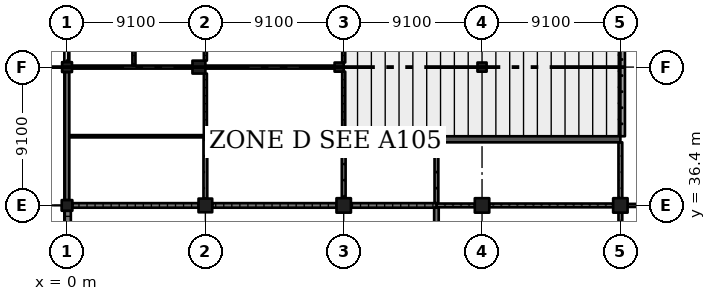
"""IFC4 building model, lengths in metres.
Left out: names, types, materials, properties, quantities, classifications, styles, units other than length and angle.
Written with IfcOpenShell. Run it as: python <this file> out.ifc"""

import sys

from ifc_helpers import new_model, si_unit, direction, frame, frame_2d, origin, origin_2d, place, context, subcontext, project, spatial, rectangle, extrude, element, fill, save


model = new_model("IFC4")
c1 = context("Model", 3, precision=1e-05, world=origin(), true_north=direction((0.0, 1.0)))
c2 = subcontext(c1, "Body", "Model", "MODEL_VIEW")
j1 = project(units=[si_unit("LENGTHUNIT", "METRE"), si_unit("PLANEANGLEUNIT", "RADIAN")], contexts=[c1])
p1 = place(None, origin())
s1 = spatial("IfcSite", under=j1, at=p1, CompositionType="ELEMENT")
p2 = place(p1, origin())
s2 = spatial("IfcBuilding", under=s1, at=p2, CompositionType="ELEMENT")
p3 = place(p2, origin())
s3 = spatial("IfcBuildingStorey", under=s2, at=p3, CompositionType="ELEMENT", Elevation=0.0)
p4 = place(p3, frame((0.0, 36.4, -0.4), z_axis=(0.0, 0.0, 1.0), x_axis=(1.0, 0.0, 0.0)))
e1 = element("IfcColumn", 1, at=p4, inside=s3, PredefinedType="COLUMN", context=c2, shape_type="SweptSolid", body=[
    extrude(rectangle(XDim=0.7, YDim=0.7, at=origin_2d()), origin(), (0.0, 0.0, 1.0), 6.77),
])
p5 = place(p3, frame((0.0, 45.5, -0.4), z_axis=(0.0, 0.0, 1.0), x_axis=(1.0, 0.0, 0.0)))
e2 = element("IfcColumn", 2, at=p5, inside=s3, PredefinedType="COLUMN", context=c2, shape_type="SweptSolid", body=[
    extrude(rectangle(XDim=0.65, YDim=0.65, at=origin_2d()), origin(), (0.0, 0.0, 1.0), 6.77),
])
p6 = place(p3, frame((9.1, 36.4, -0.4), z_axis=(0.0, 0.0, 1.0), x_axis=(1.0, 0.0, 0.0)))
e3 = element("IfcColumn", 3, at=p6, inside=s3, PredefinedType="COLUMN", context=c2, shape_type="SweptSolid", body=[
    extrude(rectangle(XDim=0.9, YDim=0.9, at=origin_2d()), origin(), (0.0, 0.0, 1.0), 6.77),
])
p7 = place(p3, frame((8.675, 45.5, -0.4), z_axis=(0.0, 0.0, 1.0), x_axis=(1.0, 0.0, 0.0)))
e4 = element("IfcColumn", 4, at=p7, inside=s3, PredefinedType="COLUMN", context=c2, shape_type="SweptSolid", body=[
    extrude(rectangle(XDim=0.85, YDim=0.85, at=origin_2d()), origin(), (0.0, 0.0, 1.0), 6.77),
])
p8 = place(p3, frame((18.2, 36.4, -0.4), z_axis=(0.0, 0.0, 1.0), x_axis=(1.0, 0.0, 0.0)))
e5 = element("IfcColumn", 5, at=p8, inside=s3, PredefinedType="COLUMN", context=c2, shape_type="SweptSolid", body=[
    extrude(rectangle(XDim=0.95, YDim=0.95, at=origin_2d()), origin(), (0.0, 0.0, 1.0), 6.77),
])
p9 = place(p3, frame((17.9, 45.5, -0.4), z_axis=(0.0, 0.0, 1.0), x_axis=(1.0, 0.0, 0.0)))
e6 = element("IfcColumn", 6, at=p9, inside=s3, PredefinedType="COLUMN", context=c2, shape_type="SweptSolid", body=[
    extrude(rectangle(XDim=0.6, YDim=0.6, at=origin_2d()), origin(), (0.0, 0.0, 1.0), 6.77),
])
p10 = place(p3, frame((27.3, 36.4, -0.4), z_axis=(0.0, 0.0, 1.0), x_axis=(1.0, 0.0, 0.0)))
e7 = element("IfcColumn", 7, at=p10, inside=s3, PredefinedType="COLUMN", context=c2, shape_type="SweptSolid", body=[
    extrude(rectangle(XDim=0.95, YDim=0.95, at=origin_2d()), origin(), (0.0, 0.0, 1.0), 6.77),
])
p11 = place(p3, frame((27.3, 45.5, -0.4), z_axis=(0.0, 0.0, 1.0), x_axis=(1.0, 0.0, 0.0)))
e8 = element("IfcColumn", 8, at=p11, inside=s3, PredefinedType="COLUMN", context=c2, shape_type="SweptSolid", body=[
    extrude(rectangle(XDim=0.6, YDim=0.6, at=origin_2d()), origin(), (0.0, 0.0, 1.0), 2.133),
])
p12 = place(p3, frame((36.4, 36.4, -0.4), z_axis=(0.0, 0.0, 1.0), x_axis=(1.0, 0.0, 0.0)))
e9 = element("IfcColumn", 9, at=p12, inside=s3, PredefinedType="COLUMN", context=c2, shape_type="SweptSolid", body=[
    extrude(rectangle(XDim=0.95, YDim=0.95, at=origin_2d()), origin(), (0.0, 0.0, 1.0), 6.77),
])
p13 = place(p3, frame((36.55, 40.95, -0.4), z_axis=(0.0, 0.0, 1.0), x_axis=(0.0, 1.0, 0.0)))
e10 = element("IfcWall", 10, at=p13, inside=s3, PredefinedType="SOLIDWALL", context=c2, shape_type="SweptSolid", body=[
    extrude(rectangle(XDim=27.3, YDim=0.3, at=frame_2d((13.65, 0.0))), origin(), (0.0, 0.0, 1.0), 1.45),
])
p14 = place(p3, frame((36.4, 40.75, -0.4), z_axis=(0.0, 0.0, 1.0), x_axis=(-1.0, 0.0, 0.0)))
e11 = element("IfcWall", 11, at=p14, inside=s3, PredefinedType="SHEAR", context=c2, shape_type="SweptSolid", body=[
    extrude(rectangle(XDim=18.2, YDim=0.4, at=frame_2d((9.1, 0.0))), origin(), (0.0, 0.0, 1.0), 6.77),
])
p15 = place(p3, frame((0.0, 54.275, 0.0), z_axis=(0.0, 0.0, 1.0), x_axis=(0.0, -1.0, 0.0)))
e12 = element("IfcWall", 12, at=p15, inside=s3, PredefinedType="SOLIDWALL", context=c2, shape_type="SweptSolid", body=[
    extrude(rectangle(XDim=8.45, YDim=0.3, at=frame_2d((4.225, 0.0))), origin(), (0.0, 0.0, 1.0), 3.75),
])
p16 = place(p15, frame((4.44, 0.0, 0.0)))
e13 = element("IfcOpeningElement", 13, at=p16, cuts=e12, PredefinedType="OPENING", context=c2, shape_type="SweptSolid", body=[
    extrude(rectangle(XDim=3.6, YDim=2.7, at=frame_2d((1.8, 1.35))), frame((0.0, 0.16, 0.0), z_axis=(0.0, -1.0, 0.0), x_axis=(1.0, 0.0, 0.0)), (0.0, 0.0, 1.0), 0.32),
])
p17 = place(p15, frame((0.41, 0.0, 0.0)))
e14 = element("IfcOpeningElement", 14, at=p17, cuts=e12, PredefinedType="OPENING", context=c2, shape_type="SweptSolid", body=[
    extrude(rectangle(XDim=3.6, YDim=2.7, at=frame_2d((1.8, 1.35))), frame((0.0, 0.16, 0.0), z_axis=(0.0, -1.0, 0.0), x_axis=(1.0, 0.0, 0.0)), (0.0, 0.0, 1.0), 0.32),
])
p18 = place(p3, frame((0.0, 45.175, 0.0), z_axis=(0.0, 0.0, 1.0), x_axis=(0.0, -1.0, 0.0)))
e15 = element("IfcWall", 15, at=p18, inside=s3, PredefinedType="SOLIDWALL", context=c2, shape_type="SweptSolid", body=[
    extrude(rectangle(XDim=8.425, YDim=0.3, at=frame_2d((4.212, 0.0))), origin(), (0.0, 0.0, 1.0), 5.27),
])
p19 = place(p3, frame((0.05, 36.05, 0.0), z_axis=(0.0, 0.0, 1.0), x_axis=(0.0, -1.0, 0.0)))
e16 = element("IfcWall", 16, at=p19, inside=s3, PredefinedType="SOLIDWALL", context=c2, shape_type="SweptSolid", body=[
    extrude(rectangle(XDim=8.375, YDim=0.4, at=frame_2d((4.188, 0.0))), origin(), (0.0, 0.0, 1.0), 5.32),
])
p20 = place(p19, frame((1.95, 0.0, 0.0)))
e17 = element("IfcOpeningElement", 17, at=p20, cuts=e16, PredefinedType="OPENING", context=c2, shape_type="SweptSolid", body=[
    extrude(rectangle(XDim=4.5, YDim=4.8, at=frame_2d((2.25, 2.4))), frame((0.0, 0.21, 0.0), z_axis=(0.0, -1.0, 0.0), x_axis=(1.0, 0.0, 0.0)), (0.0, 0.0, 1.0), 0.42),
])
p21 = place(p19, frame((0.475, 0.0, 0.0)))
e18 = element("IfcOpeningElement", 18, at=p21, cuts=e16, PredefinedType="OPENING", context=c2, shape_type="SweptSolid", body=[
    extrude(rectangle(XDim=1.0, YDim=2.1, at=frame_2d((0.5, 1.05))), frame((0.0, 0.21, 0.0), z_axis=(0.0, -1.0, 0.0), x_axis=(1.0, 0.0, 0.0)), (0.0, 0.0, 1.0), 0.42),
])
p22 = place(p3, frame((0.15, 40.95, 0.0), z_axis=(0.0, 0.0, 1.0), x_axis=(1.0, 0.0, 0.0)))
e19 = element("IfcWall", 19, at=p22, inside=s3, PredefinedType="PARTITIONING", context=c2, shape_type="SweptSolid", body=[
    extrude(rectangle(XDim=8.95, YDim=0.15, at=frame_2d((4.475, 0.0))), origin(), (0.0, 0.0, 1.0), 6.02),
])
p23 = place(p3, frame((0.35, 36.4, 0.0), z_axis=(0.0, 0.0, 1.0), x_axis=(1.0, 0.0, 0.0)))
e20 = element("IfcWall", 20, at=p23, inside=s3, PredefinedType="SOLIDWALL", context=c2, shape_type="SweptSolid", body=[
    extrude(rectangle(XDim=8.3, YDim=0.3, at=frame_2d((4.15, 0.0))), origin(), (0.0, 0.0, 1.0), 5.32),
])
p24 = place(p23, frame((3.65, 0.0, 0.0)))
e21 = element("IfcOpeningElement", 21, at=p24, cuts=e20, PredefinedType="OPENING", context=c2, shape_type="SweptSolid", body=[
    extrude(rectangle(XDim=1.0, YDim=2.1, at=frame_2d((0.5, 1.05))), frame((0.0, 0.16, 0.0), z_axis=(0.0, -1.0, 0.0), x_axis=(1.0, 0.0, 0.0)), (0.0, 0.0, 1.0), 0.32),
])
p25 = place(p3, frame((0.325, 45.5, 0.0), z_axis=(0.0, 0.0, 1.0), x_axis=(1.0, 0.0, 0.0)))
e22 = element("IfcWall", 22, at=p25, inside=s3, PredefinedType="PARTITIONING", context=c2, shape_type="SweptSolid", body=[
    extrude(rectangle(XDim=7.925, YDim=0.2, at=frame_2d((3.962, 0.0))), origin(), (0.0, 0.0, 1.0), 5.32),
])
p26 = place(p3, frame((4.4, 45.6, 0.0), z_axis=(0.0, 0.0, 1.0), x_axis=(0.0, 1.0, 0.0)))
e23 = element("IfcWall", 23, at=p26, inside=s3, PredefinedType="PARTITIONING", context=c2, shape_type="SweptSolid", body=[
    extrude(rectangle(XDim=18.0, YDim=0.2, at=frame_2d((9.0, 0.0))), origin(), (0.0, 0.0, 1.0), 6.02),
])
p27 = place(p26, frame((0.65, 0.0, 0.0)))
e24 = element("IfcOpeningElement", 24, at=p27, cuts=e23, PredefinedType="OPENING", context=c2, shape_type="SweptSolid", body=[
    extrude(rectangle(XDim=1.8, YDim=2.4, at=frame_2d((0.9, 1.2))), frame((0.0, 0.11, 0.0), z_axis=(0.0, -1.0, 0.0), x_axis=(1.0, 0.0, 0.0)), (0.0, 0.0, 1.0), 0.22),
])
p28 = place(p26, frame((3.55, 0.0, 0.0)))
e25 = element("IfcOpeningElement", 25, at=p28, cuts=e23, PredefinedType="OPENING", context=c2, shape_type="SweptSolid", body=[
    extrude(rectangle(XDim=1.8, YDim=2.4, at=frame_2d((0.9, 1.2))), frame((0.0, 0.11, 0.0), z_axis=(0.0, -1.0, 0.0), x_axis=(1.0, 0.0, 0.0)), (0.0, 0.0, 1.0), 0.22),
])
p29 = place(p26, frame((6.65, 0.0, 0.0)))
e26 = element("IfcOpeningElement", 26, at=p29, cuts=e23, PredefinedType="OPENING", context=c2, shape_type="SweptSolid", body=[
    extrude(rectangle(XDim=1.8, YDim=2.4, at=frame_2d((0.9, 1.2))), frame((0.0, 0.11, 0.0), z_axis=(0.0, -1.0, 0.0), x_axis=(1.0, 0.0, 0.0)), (0.0, 0.0, 1.0), 0.22),
])
p30 = place(p26, frame((9.65, 0.0, 0.0)))
e27 = element("IfcOpeningElement", 27, at=p30, cuts=e23, PredefinedType="OPENING", context=c2, shape_type="SweptSolid", body=[
    extrude(rectangle(XDim=1.8, YDim=2.4, at=frame_2d((0.9, 1.2))), frame((0.0, 0.11, 0.0), z_axis=(0.0, -1.0, 0.0), x_axis=(1.0, 0.0, 0.0)), (0.0, 0.0, 1.0), 0.22),
])
p31 = place(p26, frame((12.65, 0.0, 0.0)))
e28 = element("IfcOpeningElement", 28, at=p31, cuts=e23, PredefinedType="OPENING", context=c2, shape_type="SweptSolid", body=[
    extrude(rectangle(XDim=1.8, YDim=2.4, at=frame_2d((0.9, 1.2))), frame((0.0, 0.11, 0.0), z_axis=(0.0, -1.0, 0.0), x_axis=(1.0, 0.0, 0.0)), (0.0, 0.0, 1.0), 0.22),
])
p32 = place(p26, frame((15.65, 0.0, 0.0)))
e29 = element("IfcOpeningElement", 29, at=p32, cuts=e23, PredefinedType="OPENING", context=c2, shape_type="SweptSolid", body=[
    extrude(rectangle(XDim=1.8, YDim=2.4, at=frame_2d((0.9, 1.2))), frame((0.0, 0.11, 0.0), z_axis=(0.0, -1.0, 0.0), x_axis=(1.0, 0.0, 0.0)), (0.0, 0.0, 1.0), 0.22),
])
p33 = place(p3, frame((9.1, 40.825, 0.0), z_axis=(0.0, 0.0, 1.0), x_axis=(0.0, -1.0, 0.0)))
e30 = element("IfcWall", 30, at=p33, inside=s3, PredefinedType="SOLIDWALL", context=c2, shape_type="SweptSolid", body=[
    extrude(rectangle(XDim=3.975, YDim=0.25, at=frame_2d((1.987, 0.0))), origin(), (0.0, 0.0, 1.0), 5.32),
])
p34 = place(p3, frame((9.1, 40.95, 0.0), z_axis=(0.0, 0.0, 1.0), x_axis=(1.0, 0.0, 0.0)))
e31 = element("IfcWall", 31, at=p34, inside=s3, PredefinedType="SOLIDWALL", context=c2, shape_type="SweptSolid", body=[
    extrude(rectangle(XDim=9.2, YDim=0.25, at=frame_2d((4.6, 0.0))), origin(), (0.0, 0.0, 1.0), 6.02),
])
p35 = place(p3, frame((9.1, 41.075, 0.0), z_axis=(0.0, 0.0, 1.0), x_axis=(0.0, 1.0, 0.0)))
e32 = element("IfcWall", 32, at=p35, inside=s3, PredefinedType="PARTITIONING", context=c2, shape_type="SweptSolid", body=[
    extrude(rectangle(XDim=4.0, YDim=0.2, at=frame_2d((2.0, 0.0))), origin(), (0.0, 0.0, 1.0), 5.32),
])
p36 = place(p35, frame((1.45, 0.0, 0.0)))
e33 = element("IfcOpeningElement", 33, at=p36, cuts=e32, PredefinedType="OPENING", context=c2, shape_type="SweptSolid", body=[
    extrude(rectangle(XDim=1.0, YDim=2.1, at=frame_2d((0.5, 1.05))), frame((0.0, 0.11, 0.0), z_axis=(0.0, -1.0, 0.0), x_axis=(1.0, 0.0, 0.0)), (0.0, 0.0, 1.0), 0.22),
])
p37 = place(p3, frame((9.1, 45.925, 0.0), z_axis=(0.0, 0.0, 1.0), x_axis=(0.0, 1.0, 0.0)))
e34 = element("IfcWall", 34, at=p37, inside=s3, PredefinedType="PARTITIONING", context=c2, shape_type="SweptSolid", body=[
    extrude(rectangle(XDim=8.25, YDim=0.2, at=frame_2d((4.125, 0.0))), origin(), (0.0, 0.0, 1.0), 5.32),
])
p38 = place(p37, frame((1.15, 0.0, 0.0)))
e35 = element("IfcOpeningElement", 35, at=p38, cuts=e34, PredefinedType="OPENING", context=c2, shape_type="SweptSolid", body=[
    extrude(rectangle(XDim=1.8, YDim=2.4, at=frame_2d((0.9, 1.2))), frame((0.0, 0.11, 0.0), z_axis=(0.0, -1.0, 0.0), x_axis=(1.0, 0.0, 0.0)), (0.0, 0.0, 1.0), 0.22),
])
p39 = place(p37, frame((5.25, 0.0, 0.0)))
e36 = element("IfcOpeningElement", 36, at=p39, cuts=e34, PredefinedType="OPENING", context=c2, shape_type="SweptSolid", body=[
    extrude(rectangle(XDim=1.8, YDim=2.4, at=frame_2d((0.9, 1.2))), frame((0.0, 0.11, 0.0), z_axis=(0.0, -1.0, 0.0), x_axis=(1.0, 0.0, 0.0)), (0.0, 0.0, 1.0), 0.22),
])
p40 = place(p37, frame((3.45, 0.0, 0.0)))
e37 = element("IfcOpeningElement", 37, at=p40, cuts=e34, PredefinedType="OPENING", context=c2, shape_type="SweptSolid", body=[
    extrude(rectangle(XDim=1.8, YDim=2.4, at=frame_2d((0.9, 1.2))), frame((0.0, 0.11, 0.0), z_axis=(0.0, -1.0, 0.0), x_axis=(1.0, 0.0, 0.0)), (0.0, 0.0, 1.0), 0.22),
])
p41 = place(p3, frame((9.55, 36.4, 0.0), z_axis=(0.0, 0.0, 1.0), x_axis=(1.0, 0.0, 0.0)))
e38 = element("IfcWall", 38, at=p41, inside=s3, PredefinedType="SOLIDWALL", context=c2, shape_type="SweptSolid", body=[
    extrude(rectangle(XDim=8.175, YDim=0.3, at=frame_2d((4.087, 0.0))), origin(), (0.0, 0.0, 1.0), 5.32),
])
p42 = place(p41, frame((3.55, 0.0, 0.0)))
e39 = element("IfcOpeningElement", 39, at=p42, cuts=e38, PredefinedType="OPENING", context=c2, shape_type="SweptSolid", body=[
    extrude(rectangle(XDim=1.0, YDim=2.1, at=frame_2d((0.5, 1.05))), frame((0.0, 0.16, 0.0), z_axis=(0.0, -1.0, 0.0), x_axis=(1.0, 0.0, 0.0)), (0.0, 0.0, 1.0), 0.32),
])
p43 = place(p3, frame((17.6, 45.5, 0.0), z_axis=(0.0, 0.0, 1.0), x_axis=(-1.0, 0.0, 0.0)))
e40 = element("IfcWall", 40, at=p43, inside=s3, PredefinedType="PARTITIONING", context=c2, shape_type="SweptSolid", body=[
    extrude(rectangle(XDim=8.5, YDim=0.2, at=frame_2d((4.25, 0.0))), origin(), (0.0, 0.0, 1.0), 5.27),
])
p44 = place(p43, frame((0.65, 0.0, 0.0)))
e41 = element("IfcOpeningElement", 41, at=p44, cuts=e40, PredefinedType="OPENING", context=c2, shape_type="SweptSolid", body=[
    extrude(rectangle(XDim=3.0, YDim=2.4, at=frame_2d((1.5, 1.2))), frame((0.0, 0.11, 0.0), z_axis=(0.0, -1.0, 0.0), x_axis=(1.0, 0.0, 0.0)), (0.0, 0.0, 1.0), 0.22),
])
p45 = place(p43, frame((4.85, 0.0, 0.0)))
e42 = element("IfcOpeningElement", 42, at=p45, cuts=e40, PredefinedType="OPENING", context=c2, shape_type="SweptSolid", body=[
    extrude(rectangle(XDim=3.0, YDim=2.4, at=frame_2d((1.5, 1.2))), frame((0.0, 0.11, 0.0), z_axis=(0.0, -1.0, 0.0), x_axis=(1.0, 0.0, 0.0)), (0.0, 0.0, 1.0), 0.22),
])
p46 = place(p3, frame((18.2, 40.55, 0.0), z_axis=(0.0, 0.0, 1.0), x_axis=(0.0, -1.0, 0.0)))
e43 = element("IfcWall", 43, at=p46, inside=s3, PredefinedType="SOLIDWALL", context=c2, shape_type="SweptSolid", body=[
    extrude(rectangle(XDim=3.675, YDim=0.25, at=frame_2d((1.837, 0.0))), origin(), (0.0, 0.0, 1.0), 5.02),
])
p47 = place(p3, frame((18.2, 45.2, 0.0), z_axis=(0.0, 0.0, 1.0), x_axis=(0.0, -1.0, 0.0)))
e44 = element("IfcWall", 44, at=p47, inside=s3, PredefinedType="PARTITIONING", context=c2, shape_type="SweptSolid", body=[
    extrude(rectangle(XDim=4.125, YDim=0.2, at=frame_2d((2.062, 0.0))), origin(), (0.0, 0.0, 1.0), 5.02),
])
p48 = place(p3, frame((18.2, 54.3, 0.0), z_axis=(0.0, 0.0, 1.0), x_axis=(0.0, -1.0, 0.0)))
e45 = element("IfcWall", 45, at=p48, inside=s3, PredefinedType="PARTITIONING", context=c2, shape_type="SweptSolid", body=[
    extrude(rectangle(XDim=8.5, YDim=0.2, at=frame_2d((4.25, 0.0))), origin(), (0.0, 0.0, 1.0), 5.02),
])
p49 = place(p3, frame((18.675, 36.4, 0.0), z_axis=(0.0, 0.0, 1.0), x_axis=(1.0, 0.0, 0.0)))
e46 = element("IfcWall", 46, at=p49, inside=s3, PredefinedType="SOLIDWALL", context=c2, shape_type="SweptSolid", body=[
    extrude(rectangle(XDim=5.625, YDim=0.3, at=frame_2d((2.812, 0.0))), origin(), (0.0, 0.0, 1.0), 5.32),
])
p50 = place(p49, frame((2.35, 0.0, 0.0)))
e47 = element("IfcOpeningElement", 47, at=p50, cuts=e46, PredefinedType="OPENING", context=c2, shape_type="SweptSolid", body=[
    extrude(rectangle(XDim=1.0, YDim=2.1, at=frame_2d((0.5, 1.05))), frame((0.0, 0.16, 0.0), z_axis=(0.0, -1.0, 0.0), x_axis=(1.0, 0.0, 0.0)), (0.0, 0.0, 1.0), 0.32),
])
p51 = place(p3, frame((24.3, 36.25, 0.0), z_axis=(0.0, 0.0, 1.0), x_axis=(0.0, -1.0, 0.0)))
e48 = element("IfcWall", 48, at=p51, inside=s3, PredefinedType="SOLIDWALL", context=c2, shape_type="SweptSolid", body=[
    extrude(rectangle(XDim=6.32, YDim=0.3, at=frame_2d((3.16, 0.0))), origin(), (0.0, 0.0, 1.0), 6.02),
])
p52 = place(p3, frame((24.3, 36.4, 0.0), z_axis=(0.0, 0.0, 1.0), x_axis=(1.0, 0.0, 0.0)))
e49 = element("IfcWall", 49, at=p52, inside=s3, PredefinedType="SOLIDWALL", context=c2, shape_type="SweptSolid", body=[
    extrude(rectangle(XDim=2.525, YDim=0.25, at=frame_2d((1.262, 0.0))), origin(), (0.0, 0.0, 1.0), 5.32),
])
p53 = place(p3, frame((24.3, 40.55, 0.0), z_axis=(0.0, 0.0, 1.0), x_axis=(0.0, -1.0, 0.0)))
e50 = element("IfcWall", 50, at=p53, inside=s3, PredefinedType="SOLIDWALL", context=c2, shape_type="SweptSolid", body=[
    extrude(rectangle(XDim=4.0, YDim=0.25, at=frame_2d((2.0, 0.0))), origin(), (0.0, 0.0, 1.0), 6.02),
])
p54 = place(p3, frame((27.775, 36.4, 0.0), z_axis=(0.0, 0.0, 1.0), x_axis=(1.0, 0.0, 0.0)))
e51 = element("IfcWall", 51, at=p54, inside=s3, PredefinedType="SOLIDWALL", context=c2, shape_type="SweptSolid", body=[
    extrude(rectangle(XDim=8.15, YDim=0.25, at=frame_2d((4.075, 0.0))), origin(), (0.0, 0.0, 1.0), 5.32),
])
p55 = place(p3, frame((36.4, 35.925, 0.0), z_axis=(0.0, 0.0, 1.0), x_axis=(0.0, -1.0, 0.0)))
e52 = element("IfcWall", 52, at=p55, inside=s3, PredefinedType="SOLIDWALL", context=c2, shape_type="SweptSolid", body=[
    extrude(rectangle(XDim=8.175, YDim=0.25, at=frame_2d((4.087, 0.0))), origin(), (0.0, 0.0, 1.0), 5.32),
])
p56 = place(p3, frame((36.4, 40.55, 0.0), z_axis=(0.0, 0.0, 1.0), x_axis=(0.0, -1.0, 0.0)))
e53 = element("IfcWall", 53, at=p56, inside=s3, PredefinedType="SOLIDWALL", context=c2, shape_type="SweptSolid", body=[
    extrude(rectangle(XDim=3.675, YDim=0.25, at=frame_2d((1.837, 0.0))), origin(), (0.0, 0.0, 1.0), 6.02),
])
p57 = place(p56, frame((1.35, 0.0, 0.0)))
e54 = element("IfcOpeningElement", 54, at=p57, cuts=e53, PredefinedType="OPENING", context=c2, shape_type="SweptSolid", body=[
    extrude(rectangle(XDim=1.0, YDim=2.1, at=frame_2d((0.5, 1.05))), frame((0.0, 0.135, 0.0), z_axis=(0.0, -1.0, 0.0), x_axis=(1.0, 0.0, 0.0)), (0.0, 0.0, 1.0), 0.27),
])
p58 = place(p3, frame((36.875, 36.4, 0.0), z_axis=(0.0, 0.0, 1.0), x_axis=(1.0, 0.0, 0.0)))
e55 = element("IfcWall", 55, at=p58, inside=s3, PredefinedType="PARTITIONING", context=c2, shape_type="SweptSolid", body=[
    extrude(rectangle(XDim=3.675, YDim=0.2, at=frame_2d((1.837, 0.0))), origin(), (0.0, 0.0, 1.0), 6.02),
])
p59 = place(p58, frame((0.65, 0.0, 0.0)))
e56 = element("IfcOpeningElement", 56, at=p59, cuts=e55, PredefinedType="OPENING", context=c2, shape_type="SweptSolid", body=[
    extrude(rectangle(XDim=2.4, YDim=2.4, at=frame_2d((1.2, 1.2))), frame((0.0, 0.11, 0.0), z_axis=(0.0, -1.0, 0.0), x_axis=(1.0, 0.0, 0.0)), (0.0, 0.0, 1.0), 0.22),
])
p60 = place(p16, frame((3.6, 0.0, 0.0), z_axis=(0.0, 0.0, 1.0), x_axis=(-1.0, 0.0, 0.0)))
e57 = element("IfcDoor", 57, at=p60, inside=s3, OperationType="DOUBLE_DOOR_SINGLE_SWING", PredefinedType="DOOR", context=c2, shape_type="SweptSolid", body=[
    extrude(rectangle(XDim=3.6, YDim=2.7, at=frame_2d((1.8, 1.35))), frame((0.0, 0.025, 0.0), z_axis=(0.0, -1.0, 0.0), x_axis=(1.0, 0.0, 0.0)), (0.0, 0.0, 1.0), 0.05),
])
fill(e13, e57)
p61 = place(p21, frame((1.0, 0.0, 0.0), z_axis=(0.0, 0.0, 1.0), x_axis=(-1.0, 0.0, 0.0)))
e58 = element("IfcDoor", 58, at=p61, inside=s3, OperationType="SINGLE_SWING_LEFT", PredefinedType="DOOR", context=c2, shape_type="SweptSolid", body=[
    extrude(rectangle(XDim=1.0, YDim=2.1, at=frame_2d((0.5, 1.05))), frame((0.0, 0.025, 0.0), z_axis=(0.0, -1.0, 0.0), x_axis=(1.0, 0.0, 0.0)), (0.0, 0.0, 1.0), 0.05),
])
fill(e18, e58)
p62 = place(p24, origin())
e59 = element("IfcDoor", 59, at=p62, inside=s3, OperationType="SINGLE_SWING_RIGHT", PredefinedType="DOOR", context=c2, shape_type="SweptSolid", body=[
    extrude(rectangle(XDim=1.0, YDim=2.1, at=frame_2d((0.5, 1.05))), frame((0.0, 0.025, 0.0), z_axis=(0.0, -1.0, 0.0), x_axis=(1.0, 0.0, 0.0)), (0.0, 0.0, 1.0), 0.05),
])
fill(e21, e59)
p63 = place(p50, origin())
e60 = element("IfcDoor", 60, at=p63, inside=s3, OperationType="SINGLE_SWING_LEFT", PredefinedType="DOOR", context=c2, shape_type="SweptSolid", body=[
    extrude(rectangle(XDim=1.0, YDim=2.1, at=frame_2d((0.5, 1.05))), frame((0.0, 0.025, 0.0), z_axis=(0.0, -1.0, 0.0), x_axis=(1.0, 0.0, 0.0)), (0.0, 0.0, 1.0), 0.05),
])
fill(e47, e60)
p64 = place(p57, origin())
e61 = element("IfcDoor", 61, at=p64, inside=s3, OperationType="SINGLE_SWING_RIGHT", PredefinedType="DOOR", context=c2, shape_type="SweptSolid", body=[
    extrude(rectangle(XDim=1.0, YDim=2.1, at=frame_2d((0.5, 1.05))), frame((0.0, 0.025, 0.0), z_axis=(0.0, -1.0, 0.0), x_axis=(1.0, 0.0, 0.0)), (0.0, 0.0, 1.0), 0.05),
])
fill(e54, e61)
p65 = place(p42, origin())
e62 = element("IfcDoor", 62, at=p65, inside=s3, OperationType="SINGLE_SWING_RIGHT", PredefinedType="DOOR", context=c2, shape_type="SweptSolid", body=[
    extrude(rectangle(XDim=1.0, YDim=2.1, at=frame_2d((0.5, 1.05))), frame((0.0, 0.025, 0.0), z_axis=(0.0, -1.0, 0.0), x_axis=(1.0, 0.0, 0.0)), (0.0, 0.0, 1.0), 0.05),
])
fill(e39, e62)
p66 = place(p36, origin())
e63 = element("IfcDoor", 63, at=p66, inside=s3, OperationType="SINGLE_SWING_RIGHT", PredefinedType="DOOR", context=c2, shape_type="SweptSolid", body=[
    extrude(rectangle(XDim=1.0, YDim=2.1, at=frame_2d((0.5, 1.05))), frame((0.0, 0.025, 0.0), z_axis=(0.0, -1.0, 0.0), x_axis=(1.0, 0.0, 0.0)), (0.0, 0.0, 1.0), 0.05),
])
fill(e33, e63)
p67 = place(p44, origin())
e64 = element("IfcDoor", 64, at=p67, inside=s3, OperationType="DOUBLE_DOOR_SINGLE_SWING", PredefinedType="DOOR", context=c2, shape_type="SweptSolid", body=[
    extrude(rectangle(XDim=3.0, YDim=2.4, at=frame_2d((1.5, 1.2))), frame((0.0, 0.025, 0.0), z_axis=(0.0, -1.0, 0.0), x_axis=(1.0, 0.0, 0.0)), (0.0, 0.0, 1.0), 0.05),
])
fill(e41, e64)
p68 = place(p45, origin())
e65 = element("IfcDoor", 65, at=p68, inside=s3, OperationType="DOUBLE_DOOR_SINGLE_SWING", PredefinedType="DOOR", context=c2, shape_type="SweptSolid", body=[
    extrude(rectangle(XDim=3.0, YDim=2.4, at=frame_2d((1.5, 1.2))), frame((0.0, 0.025, 0.0), z_axis=(0.0, -1.0, 0.0), x_axis=(1.0, 0.0, 0.0)), (0.0, 0.0, 1.0), 0.05),
])
fill(e42, e65)
p69 = place(p27, origin())
e66 = element("IfcDoor", 66, at=p69, inside=s3, OperationType="DOUBLE_DOOR_SINGLE_SWING", PredefinedType="DOOR", context=c2, shape_type="SweptSolid", body=[
    extrude(rectangle(XDim=1.8, YDim=2.4, at=frame_2d((0.9, 1.2))), frame((0.0, 0.025, 0.0), z_axis=(0.0, -1.0, 0.0), x_axis=(1.0, 0.0, 0.0)), (0.0, 0.0, 1.0), 0.05),
])
fill(e24, e66)
save(model, sys.argv[1])
